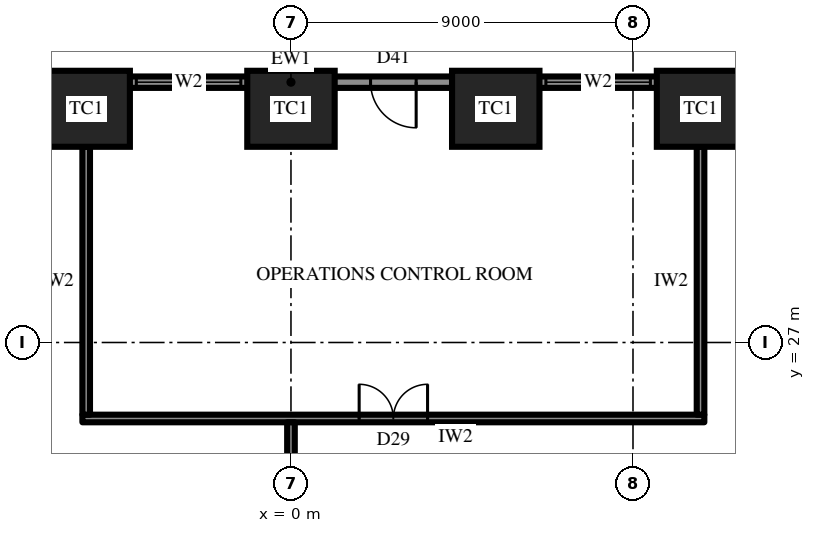
"""IFC4 building model, lengths in metres.
Left out: names, types, materials, properties, quantities, classifications, styles, units other than length and angle.
Written with IfcOpenShell. Run it as: python <this file> out.ifc"""

import sys

from ifc_helpers import new_model, si_unit, direction, frame, frame_2d, origin, origin_2d, place, context, subcontext, project, spatial, rectangle, extrude, element, fill, save


model = new_model("IFC4")
c1 = context("Model", 3, precision=1e-05, world=origin(), true_north=direction((0.0, 1.0)))
c2 = subcontext(c1, "Body", "Model", "MODEL_VIEW")
j1 = project(units=[si_unit("LENGTHUNIT", "METRE"), si_unit("PLANEANGLEUNIT", "RADIAN")], contexts=[c1])
p1 = place(None, origin())
s1 = spatial("IfcSite", under=j1, at=p1, CompositionType="ELEMENT")
p2 = place(p1, origin())
s2 = spatial("IfcBuilding", under=s1, at=p2, CompositionType="ELEMENT")
p3 = place(p2, frame((0.0, 0.0, 27.7)))
s3 = spatial("IfcBuildingStorey", under=s2, at=p3, CompositionType="ELEMENT", Elevation=27.7)
for number, where, z_axis, x_axis in (
    (1, (10.777, 33.15, 0.0), (0.0, 0.0, 1.0), (-1.0, 0.0, 0.0)),
    (2, (5.389, 33.15, 0.0), (0.0, 0.0, 1.0), (-1.0, 0.0, 0.0)),
    (3, (0.0, 33.15, 0.0), (0.0, 0.0, 1.0), (-1.0, 0.0, 0.0)),
    (4, (-5.389, 33.15, 0.0), (0.0, 0.0, 1.0), (-1.0, 0.0, 0.0)),
):
    element("IfcColumn", number, at=place(p3, frame(where, z_axis=z_axis, x_axis=x_axis)), inside=s3, PredefinedType="COLUMN", context=c2, shape_type="SweptSolid", body=[
        extrude(rectangle(XDim=2.3, YDim=2.0, at=origin_2d()), origin(), (0.0, 0.0, 1.0), 4.2),
    ])
p4 = place(p3, frame((16.166, 33.85, 0.0), z_axis=(0.0, 0.0, 1.0), x_axis=(-1.0, 0.0, 0.0)))
e5 = element("IfcWall", 5, at=p4, inside=s3, PredefinedType="SOLIDWALL", context=c2, shape_type="SweptSolid", body=[
    extrude(rectangle(XDim=32.332, YDim=0.3, at=frame_2d((16.166, 0.0))), origin(), (0.0, 0.0, 1.0), 2.7),
])
p5 = place(p4, frame((1.319, 0.0, 0.6)))
e6 = element("IfcOpeningElement", 6, at=p5, cuts=e5, PredefinedType="OPENING", context=c2, shape_type="SweptSolid", body=[
    extrude(rectangle(XDim=2.75, YDim=1.85, at=frame_2d((1.375, 0.925))), frame((0.0, 0.16, 0.0), z_axis=(0.0, -1.0, 0.0), x_axis=(1.0, 0.0, 0.0)), (0.0, 0.0, 1.0), 0.32),
])
p6 = place(p4, frame((6.708, 0.0, 0.6)))
e7 = element("IfcOpeningElement", 7, at=p6, cuts=e5, PredefinedType="OPENING", context=c2, shape_type="SweptSolid", body=[
    extrude(rectangle(XDim=2.75, YDim=1.85, at=frame_2d((1.375, 0.925))), frame((0.0, 0.16, 0.0), z_axis=(0.0, -1.0, 0.0), x_axis=(1.0, 0.0, 0.0)), (0.0, 0.0, 1.0), 0.32),
])
p7 = place(p4, frame((12.872, 0.0, 0.0)))
e8 = element("IfcOpeningElement", 8, at=p7, cuts=e5, PredefinedType="OPENING", context=c2, shape_type="SweptSolid", body=[
    extrude(rectangle(XDim=1.2, YDim=2.4, at=frame_2d((0.6, 1.2))), frame((0.0, 0.16, 0.0), z_axis=(0.0, -1.0, 0.0), x_axis=(1.0, 0.0, 0.0)), (0.0, 0.0, 1.0), 0.32),
])
p8 = place(p4, frame((17.485, 0.0, 0.6)))
e9 = element("IfcOpeningElement", 9, at=p8, cuts=e5, PredefinedType="OPENING", context=c2, shape_type="SweptSolid", body=[
    extrude(rectangle(XDim=2.75, YDim=1.85, at=frame_2d((1.375, 0.925))), frame((0.0, 0.16, 0.0), z_axis=(0.0, -1.0, 0.0), x_axis=(1.0, 0.0, 0.0)), (0.0, 0.0, 1.0), 0.32),
])
p9 = place(p4, frame((22.874, 0.0, 0.6)))
e10 = element("IfcOpeningElement", 10, at=p9, cuts=e5, PredefinedType="OPENING", context=c2, shape_type="SweptSolid", body=[
    extrude(rectangle(XDim=2.75, YDim=1.85, at=frame_2d((1.375, 0.925))), frame((0.0, 0.16, 0.0), z_axis=(0.0, -1.0, 0.0), x_axis=(1.0, 0.0, 0.0)), (0.0, 0.0, 1.0), 0.32),
])
p10 = place(p4, frame((28.262, 0.0, 0.6)))
e11 = element("IfcOpeningElement", 11, at=p10, cuts=e5, PredefinedType="OPENING", context=c2, shape_type="SweptSolid", body=[
    extrude(rectangle(XDim=2.75, YDim=1.85, at=frame_2d((1.375, 0.925))), frame((0.0, 0.16, 0.0), z_axis=(0.0, -1.0, 0.0), x_axis=(1.0, 0.0, 0.0)), (0.0, 0.0, 1.0), 0.32),
])
p11 = place(p3, frame((10.877, 25.0, 0.0), z_axis=(0.0, 0.0, 1.0), x_axis=(-1.0, 0.0, 0.0)))
e12 = element("IfcWall", 12, at=p11, inside=s3, PredefinedType="PARTITIONING", context=c2, shape_type="SweptSolid", body=[
    extrude(rectangle(XDim=16.366, YDim=0.2, at=frame_2d((8.183, 0.0))), origin(), (0.0, 0.0, 1.0), 4.0),
])
p12 = place(p11, frame((7.283, 0.0, 0.0)))
e13 = element("IfcOpeningElement", 13, at=p12, cuts=e12, PredefinedType="OPENING", context=c2, shape_type="SweptSolid", body=[
    extrude(rectangle(XDim=1.8, YDim=2.4, at=frame_2d((0.9, 1.2))), frame((0.0, 0.11, 0.0), z_axis=(0.0, -1.0, 0.0), x_axis=(1.0, 0.0, 0.0)), (0.0, 0.0, 1.0), 0.22),
])
for number, where, z_axis, x_axis in (
    (14, (10.777, 25.1, 0.0), (0.0, 0.0, 1.0), (0.0, 1.0, 0.0)),
    (15, (-5.389, 25.1, 0.0), (0.0, 0.0, 1.0), (0.0, 1.0, 0.0)),
):
    element("IfcWall", number, at=place(p3, frame(where, z_axis=z_axis, x_axis=x_axis)), inside=s3, PredefinedType="PARTITIONING", context=c2, shape_type="SweptSolid", body=[
        extrude(rectangle(XDim=7.05, YDim=0.2, at=frame_2d((3.525, 0.0))), origin(), (0.0, 0.0, 1.0), 2.944),
    ])
p13 = place(p3, frame((0.0, 18.2, 0.0), z_axis=(0.0, 0.0, 1.0), x_axis=(0.0, 1.0, 0.0)))
e16 = element("IfcWall", 16, at=p13, inside=s3, PredefinedType="PARTITIONING", context=c2, shape_type="SweptSolid", body=[
    extrude(rectangle(XDim=6.7, YDim=0.2, at=frame_2d((3.35, 0.0))), origin(), (0.0, 0.0, 1.0), 2.944),
])
p14 = place(p13, frame((0.2, 0.0, 0.0)))
e17 = element("IfcOpeningElement", 17, at=p14, cuts=e16, PredefinedType="OPENING", context=c2, shape_type="SweptSolid", body=[
    extrude(rectangle(XDim=1.0, YDim=2.2, at=frame_2d((0.5, 1.1))), frame((0.0, 0.11, 0.0), z_axis=(0.0, -1.0, 0.0), x_axis=(1.0, 0.0, 0.0)), (0.0, 0.0, 1.0), 0.22),
])
p15 = place(p6, origin())
e18 = element("IfcWindow", 18, at=p15, inside=s3, PartitioningType="SINGLE_PANEL", PredefinedType="WINDOW", context=c2, shape_type="SweptSolid", body=[
    extrude(rectangle(XDim=2.75, YDim=1.85, at=frame_2d((1.375, 0.925))), frame((0.0, 0.03, 0.0), z_axis=(0.0, -1.0, 0.0), x_axis=(1.0, 0.0, 0.0)), (0.0, 0.0, 1.0), 0.06),
])
fill(e7, e18)
p16 = place(p7, origin())
e19 = element("IfcDoor", 19, at=p16, inside=s3, OperationType="SINGLE_SWING_RIGHT", PredefinedType="DOOR", context=c2, shape_type="SweptSolid", body=[
    extrude(rectangle(XDim=1.2, YDim=2.4, at=frame_2d((0.6, 1.2))), frame((0.0, 0.025, 0.0), z_axis=(0.0, -1.0, 0.0), x_axis=(1.0, 0.0, 0.0)), (0.0, 0.0, 1.0), 0.05),
])
fill(e8, e19)
p17 = place(p8, origin())
e20 = element("IfcWindow", 20, at=p17, inside=s3, PartitioningType="SINGLE_PANEL", PredefinedType="WINDOW", context=c2, shape_type="SweptSolid", body=[
    extrude(rectangle(XDim=2.75, YDim=1.85, at=frame_2d((1.375, 0.925))), frame((0.0, 0.03, 0.0), z_axis=(0.0, -1.0, 0.0), x_axis=(1.0, 0.0, 0.0)), (0.0, 0.0, 1.0), 0.06),
])
fill(e9, e20)
p18 = place(p12, frame((1.8, 0.0, 0.0), z_axis=(0.0, 0.0, 1.0), x_axis=(-1.0, 0.0, 0.0)))
e21 = element("IfcDoor", 21, at=p18, inside=s3, OperationType="DOUBLE_DOOR_SINGLE_SWING", PredefinedType="DOOR", context=c2, shape_type="SweptSolid", body=[
    extrude(rectangle(XDim=1.8, YDim=2.4, at=frame_2d((0.9, 1.2))), frame((0.0, 0.025, 0.0), z_axis=(0.0, -1.0, 0.0), x_axis=(1.0, 0.0, 0.0)), (0.0, 0.0, 1.0), 0.05),
])
fill(e13, e21)
save(model, sys.argv[1])
